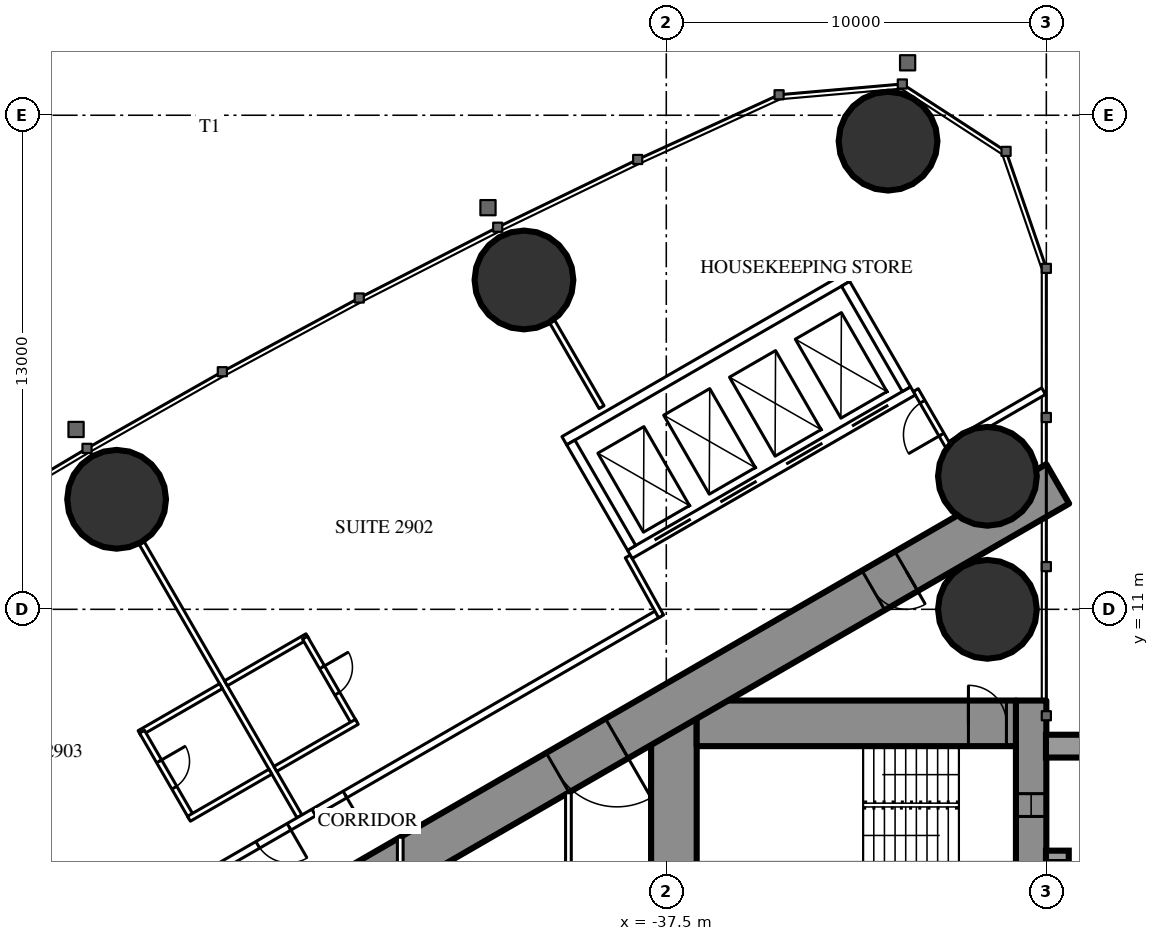
"""IFC4 building model, lengths in metres.
Left out: names, types, materials, properties, quantities, classifications, styles, units other than length and angle.
Written with IfcOpenShell. Run it as: python <this file> out.ifc"""

import sys

from ifc_helpers import new_model, si_unit, direction, frame, frame_2d, origin, origin_2d, place, context, subcontext, project, spatial, rectangle, hollow_circle, extrude, element, fill, save


model = new_model("IFC4")
c1 = context("Model", 3, precision=1e-05, world=origin(), true_north=direction((0.0, 1.0)))
c2 = subcontext(c1, "Body", "Model", "MODEL_VIEW")
j1 = project(units=[si_unit("LENGTHUNIT", "METRE"), si_unit("PLANEANGLEUNIT", "RADIAN")], contexts=[c1])
p1 = place(None, origin())
s1 = spatial("IfcSite", under=j1, at=p1, CompositionType="ELEMENT")
p2 = place(p1, origin())
s2 = spatial("IfcBuilding", under=s1, at=p2, CompositionType="ELEMENT")
p3 = place(p2, frame((0.0, 0.0, 111.6)))
s3 = spatial("IfcBuildingStorey", under=s2, at=p3, CompositionType="ELEMENT", Elevation=111.6)
for number, where, z_axis, x_axis in (
    (1, (-31.665, 23.318, 0.0), (0.0, 0.0, 1.0), (1.0, 0.0, 0.0)),
    (2, (-29.05, 11.0, 0.0), (0.0, 0.0, 1.0), (1.0, 0.0, 0.0)),
    (3, (-29.05, 14.5, 0.0), (0.0, 0.0, 1.0), (1.0, 0.0, 0.0)),
    (4, (-41.245, 19.666, 0.0), (0.0, 0.0, 1.0), (1.0, 0.0, 0.0)),
    (5, (-51.963, 13.895, 0.0), (0.0, 0.0, 1.0), (1.0, 0.0, 0.0)),
):
    element("IfcColumn", number, at=place(p3, frame(where, z_axis=z_axis, x_axis=x_axis)), inside=s3, PredefinedType="COLUMN", context=c2, shape_type="SweptSolid", body=[
        extrude(hollow_circle(Radius=1.3, WallThickness=0.1, at=origin_2d()), origin(), (0.0, 0.0, 1.0), 3.5),
    ])
p4 = place(p3, frame((-27.9, 8.6, 0.0), z_axis=(0.0, 0.0, 1.0), x_axis=(0.0, -1.0, 0.0)))
e6 = element("IfcWall", 6, at=p4, inside=s3, PredefinedType="SHEAR", context=c2, shape_type="SweptSolid", body=[
    extrude(rectangle(XDim=17.2, YDim=0.8, at=frame_2d((8.6, 0.0))), origin(), (0.0, 0.0, 1.0), 3.5),
])
p5 = place(p4, frame((2.45, 0.0, 0.6)))
e7 = element("IfcOpeningElement", 7, at=p5, cuts=e6, PredefinedType="OPENING", context=c2, shape_type="SweptSolid", body=[
    extrude(rectangle(XDim=0.6, YDim=2.1, at=frame_2d((0.3, 1.05))), frame((0.0, 0.41, 0.0), z_axis=(0.0, -1.0, 0.0), x_axis=(1.0, 0.0, 0.0)), (0.0, 0.0, 1.0), 0.82),
])
p6 = place(p4, frame((14.15, 0.0, 0.6)))
e8 = element("IfcOpeningElement", 8, at=p6, cuts=e6, PredefinedType="OPENING", context=c2, shape_type="SweptSolid", body=[
    extrude(rectangle(XDim=0.6, YDim=2.1, at=frame_2d((0.3, 1.05))), frame((0.0, 0.41, 0.0), z_axis=(0.0, -1.0, 0.0), x_axis=(1.0, 0.0, 0.0)), (0.0, 0.0, 1.0), 0.82),
])
p7 = place(p3, frame((-37.3, 8.6, 0.0), z_axis=(0.0, 0.0, 1.0), x_axis=(0.0, -1.0, 0.0)))
e9 = element("IfcWall", 9, at=p7, inside=s3, PredefinedType="SHEAR", context=c2, shape_type="SweptSolid", body=[
    extrude(rectangle(XDim=17.2, YDim=1.2, at=frame_2d((8.6, 0.0))), origin(), (0.0, 0.0, 1.0), 3.5),
])
p8 = place(p7, frame((7.7, 0.0, 0.0)))
e10 = element("IfcOpeningElement", 10, at=p8, cuts=e9, PredefinedType="OPENING", context=c2, shape_type="SweptSolid", body=[
    extrude(rectangle(XDim=1.8, YDim=2.2, at=frame_2d((0.9, 1.1))), frame((0.0, 0.61, 0.0), z_axis=(0.0, -1.0, 0.0), x_axis=(1.0, 0.0, 0.0)), (0.0, 0.0, 1.0), 1.22),
])
p9 = place(p3, frame((-28.3, 8.0, 0.0), z_axis=(0.0, 0.0, 1.0), x_axis=(-1.0, 0.0, 0.0)))
e11 = element("IfcWall", 11, at=p9, inside=s3, PredefinedType="SHEAR", context=c2, shape_type="SweptSolid", body=[
    extrude(rectangle(XDim=8.4, YDim=1.2, at=frame_2d((4.2, 0.0))), origin(), (0.0, 0.0, 1.0), 3.5),
])
p10 = place(p9, frame((0.25, 0.0, 0.0)))
e12 = element("IfcOpeningElement", 12, at=p10, cuts=e11, PredefinedType="OPENING", context=c2, shape_type="SweptSolid", body=[
    extrude(rectangle(XDim=1.0, YDim=2.2, at=frame_2d((0.5, 1.1))), frame((0.0, 0.61, 0.0), z_axis=(0.0, -1.0, 0.0), x_axis=(1.0, 0.0, 0.0)), (0.0, 0.0, 1.0), 1.22),
])
p11 = place(p3, frame((-27.2, 14.3, 0.0), z_axis=(0.0, 0.0, 1.0), x_axis=(-0.866026593062, -0.499997940104, 0.0)))
e13 = element("IfcWall", 13, at=p11, inside=s3, PredefinedType="SHEAR", context=c2, shape_type="SweptSolid", body=[
    extrude(rectangle(XDim=28.946, YDim=1.2, at=frame_2d((14.473, 0.0))), origin(), (0.0, 0.0, 1.0), 3.5),
])
p12 = place(p11, frame((4.6, 0.0, 0.0)))
e14 = element("IfcOpeningElement", 14, at=p12, cuts=e13, PredefinedType="OPENING", context=c2, shape_type="SweptSolid", body=[
    extrude(rectangle(XDim=1.0, YDim=2.2, at=frame_2d((0.5, 1.1))), frame((0.0, 0.61, 0.0), z_axis=(0.0, -1.0, 0.0), x_axis=(1.0, 0.0, 0.0)), (0.0, 0.0, 1.0), 1.22),
])
p13 = place(p11, frame((13.395, 0.0, 0.0)))
e15 = element("IfcOpeningElement", 15, at=p13, cuts=e13, PredefinedType="OPENING", context=c2, shape_type="SweptSolid", body=[
    extrude(rectangle(XDim=1.8, YDim=2.2, at=frame_2d((0.9, 1.1))), frame((0.0, 0.61, 0.0), z_axis=(0.0, -1.0, 0.0), x_axis=(1.0, 0.0, 0.0)), (0.0, 0.0, 1.0), 1.22),
])
p14 = place(p3, frame((-47.151, 5.552, 0.0), z_axis=(0.0, 0.0, 1.0), x_axis=(-0.500003012045, 0.866023664773, 0.0)))
e16 = element("IfcWall", 16, at=p14, inside=s3, PredefinedType="PARTITIONING", context=c2, shape_type="SweptSolid", body=[
    extrude(rectangle(XDim=8.311, YDim=0.15, at=frame_2d((4.156, 0.0))), origin(), (0.0, 0.0, 1.0), 2.2),
])
p15 = place(p3, frame((-39.202, 16.32, 0.0), z_axis=(0.0, 0.0, 1.0), x_axis=(-0.499947391036, 0.866055775454, 0.0)))
e17 = element("IfcWall", 17, at=p15, inside=s3, PredefinedType="PARTITIONING", context=c2, shape_type="SweptSolid", body=[
    extrude(rectangle(XDim=2.599, YDim=0.15, at=frame_2d((1.3, 0.0))), origin(), (0.0, 0.0, 1.0), 3.25),
])
p16 = place(p3, frame((-27.572, 16.741, 0.0), z_axis=(0.0, 0.0, 1.0), x_axis=(-0.866034618596, -0.499984039138, 0.0)))
e18 = element("IfcWall", 18, at=p16, inside=s3, PredefinedType="PARTITIONING", context=c2, shape_type="SweptSolid", body=[
    extrude(rectangle(XDim=2.854, YDim=0.2, at=frame_2d((1.427, 0.0))), origin(), (0.0, 0.0, 1.0), 3.25),
])
p17 = place(p3, frame((-37.7, 10.894, 0.0), z_axis=(0.0, 0.0, 1.0), x_axis=(-0.866027905338, -0.499995667157, 0.0)))
e19 = element("IfcWall", 19, at=p17, inside=s3, PredefinedType="PARTITIONING", context=c2, shape_type="SweptSolid", body=[
    extrude(rectangle(XDim=21.787, YDim=0.2, at=frame_2d((10.894, 0.0))), origin(), (0.0, 0.0, 1.0), 3.25),
])
p18 = place(p17, frame((11.23, 0.0, 0.0)))
e20 = element("IfcOpeningElement", 20, at=p18, cuts=e19, PredefinedType="OPENING", context=c2, shape_type="SweptSolid", body=[
    extrude(rectangle(XDim=0.95, YDim=2.2, at=frame_2d((0.475, 1.1))), frame((0.0, 0.11, 0.0), z_axis=(0.0, -1.0, 0.0), x_axis=(1.0, 0.0, 0.0)), (0.0, 0.0, 1.0), 0.22),
])
p19 = place(p17, frame((9.531, 0.0, 0.0)))
e21 = element("IfcOpeningElement", 21, at=p19, cuts=e19, PredefinedType="OPENING", context=c2, shape_type="SweptSolid", body=[
    extrude(rectangle(XDim=0.95, YDim=2.2, at=frame_2d((0.475, 1.1))), frame((0.0, 0.11, 0.0), z_axis=(0.0, -1.0, 0.0), x_axis=(1.0, 0.0, 0.0)), (0.0, 0.0, 1.0), 0.22),
])
p20 = place(p3, frame((-38.513, 12.392, 0.0), z_axis=(0.0, 0.0, 1.0), x_axis=(0.485585508183, -0.874189175317, 0.0)))
e22 = element("IfcWall", 22, at=p20, inside=s3, PredefinedType="PARTITIONING", context=c2, shape_type="SweptSolid", body=[
    extrude(rectangle(XDim=1.805, YDim=0.15, at=frame_2d((0.902, 0.0))), origin(), (0.0, 0.0, 1.0), 3.25),
])
p21 = place(p3, frame((-30.033, 15.205, 0.0), z_axis=(0.0, 0.0, 1.0), x_axis=(-0.499980071345, 0.866036909293, 0.0)))
e23 = element("IfcWall", 23, at=p21, inside=s3, PredefinedType="PARTITIONING", context=c2, shape_type="SweptSolid", body=[
    extrude(rectangle(XDim=1.805, YDim=0.15, at=frame_2d((0.902, 0.0))), origin(), (0.0, 0.0, 1.0), 2.2),
])
p22 = place(p21, frame((0.452, 0.0, 0.0)))
e24 = element("IfcOpeningElement", 24, at=p22, cuts=e23, PredefinedType="OPENING", context=c2, shape_type="SweptSolid", body=[
    extrude(rectangle(XDim=1.0, YDim=2.2, at=frame_2d((0.5, 1.1))), frame((0.0, 0.085, 0.0), z_axis=(0.0, -1.0, 0.0), x_axis=(1.0, 0.0, 0.0)), (0.0, 0.0, 1.0), 0.17),
])
p23 = place(p3, frame((-49.216, 8.979, 0.0), z_axis=(0.0, 0.0, 1.0), x_axis=(-0.866031185235, -0.4999899861, 0.0)))
e25 = element("IfcWall", 25, at=p23, inside=s3, PredefinedType="PARTITIONING", context=c2, shape_type="SweptSolid", body=[
    extrude(rectangle(XDim=2.475, YDim=0.15, at=frame_2d((1.238, 0.0))), origin(), (0.0, 0.0, 1.0), 3.25),
])
p24 = place(p3, frame((-49.995, 5.527, 0.0), z_axis=(0.0, 0.0, 1.0), x_axis=(-0.500006934395, 0.866021400173, 0.0)))
e26 = element("IfcWall", 26, at=p24, inside=s3, PredefinedType="PARTITIONING", context=c2, shape_type="SweptSolid", body=[
    extrude(rectangle(XDim=2.6, YDim=0.15, at=frame_2d((1.3, 0.0))), origin(), (0.0, 0.0, 1.0), 3.25),
])
p25 = place(p24, frame((0.9, 0.0, 0.0)))
e27 = element("IfcOpeningElement", 27, at=p25, cuts=e26, PredefinedType="OPENING", context=c2, shape_type="SweptSolid", body=[
    extrude(rectangle(XDim=0.8, YDim=2.2, at=frame_2d((0.4, 1.1))), frame((0.0, 0.085, 0.0), z_axis=(0.0, -1.0, 0.0), x_axis=(1.0, 0.0, 0.0)), (0.0, 0.0, 1.0), 0.17),
])
p26 = place(p3, frame((-47.916, 6.727, 0.0), z_axis=(0.0, 0.0, 1.0), x_axis=(-0.866031185235, -0.4999899861, 0.0)))
e28 = element("IfcWall", 28, at=p26, inside=s3, PredefinedType="PARTITIONING", context=c2, shape_type="SweptSolid", body=[
    extrude(rectangle(XDim=2.475, YDim=0.15, at=frame_2d((1.238, 0.0))), origin(), (0.0, 0.0, 1.0), 3.25),
])
p27 = place(p3, frame((-46.943, 10.292, 0.0), z_axis=(0.0, 0.0, 1.0), x_axis=(-0.866006523861, -0.500032699561, 0.0)))
e29 = element("IfcWall", 29, at=p27, inside=s3, PredefinedType="PARTITIONING", context=c2, shape_type="SweptSolid", body=[
    extrude(rectangle(XDim=2.475, YDim=0.15, at=frame_2d((1.237, 0.0))), origin(), (0.0, 0.0, 1.0), 3.25),
])
p28 = place(p3, frame((-45.708, 8.002, 0.0), z_axis=(0.0, 0.0, 1.0), x_axis=(-0.500047596559, 0.865997922154, 0.0)))
e30 = element("IfcWall", 30, at=p28, inside=s3, PredefinedType="PARTITIONING", context=c2, shape_type="SweptSolid", body=[
    extrude(rectangle(XDim=2.6, YDim=0.15, at=frame_2d((1.3, 0.0))), origin(), (0.0, 0.0, 1.0), 3.25),
])
p29 = place(p28, frame((0.9, 0.0, 0.0)))
e31 = element("IfcOpeningElement", 31, at=p29, cuts=e30, PredefinedType="OPENING", context=c2, shape_type="SweptSolid", body=[
    extrude(rectangle(XDim=0.8, YDim=2.2, at=frame_2d((0.4, 1.1))), frame((0.0, 0.085, 0.0), z_axis=(0.0, -1.0, 0.0), x_axis=(1.0, 0.0, 0.0)), (0.0, 0.0, 1.0), 0.17),
])
p30 = place(p3, frame((-45.643, 8.04, 0.0), z_axis=(0.0, 0.0, 1.0), x_axis=(-0.866006523861, -0.500032699561, 0.0)))
e32 = element("IfcWall", 32, at=p30, inside=s3, PredefinedType="PARTITIONING", context=c2, shape_type="SweptSolid", body=[
    extrude(rectangle(XDim=2.475, YDim=0.15, at=frame_2d((1.237, 0.0))), origin(), (0.0, 0.0, 1.0), 3.25),
])
p31 = place(p3, frame((-40.075, 6.174, 0.0), z_axis=(0.0, 0.0, 1.0), x_axis=(0.0, -1.0, 0.0)))
e33 = element("IfcWall", 33, at=p31, inside=s3, PredefinedType="PARTITIONING", context=c2, shape_type="SweptSolid", body=[
    extrude(rectangle(XDim=7.374, YDim=0.15, at=frame_2d((3.687, 0.0))), origin(), (0.0, 0.0, 1.0), 3.25),
])
p32 = place(p31, frame((2.787, 0.0, 0.0)))
e34 = element("IfcOpeningElement", 34, at=p32, cuts=e33, PredefinedType="OPENING", context=c2, shape_type="SweptSolid", body=[
    extrude(rectangle(XDim=1.8, YDim=2.2, at=frame_2d((0.9, 1.1))), frame((0.0, 0.085, 0.0), z_axis=(0.0, -1.0, 0.0), x_axis=(1.0, 0.0, 0.0)), (0.0, 0.0, 1.0), 0.17),
])
p33 = place(p3, frame((-44.5, 5.005, 0.0), z_axis=(0.0, 0.0, 1.0), x_axis=(0.0, -1.0, 0.0)))
e35 = element("IfcWall", 35, at=p33, inside=s3, PredefinedType="PARTITIONING", context=c2, shape_type="SweptSolid", body=[
    extrude(rectangle(XDim=10.009, YDim=0.15, at=frame_2d((5.005, 0.0))), origin(), (0.0, 0.0, 1.0), 2.45),
])
p34 = place(p33, frame((2.002, 0.0, 0.0)))
e36 = element("IfcOpeningElement", 36, at=p34, cuts=e35, PredefinedType="OPENING", context=c2, shape_type="SweptSolid", body=[
    extrude(rectangle(XDim=1.0, YDim=2.2, at=frame_2d((0.5, 1.1))), frame((0.0, 0.085, 0.0), z_axis=(0.0, -1.0, 0.0), x_axis=(1.0, 0.0, 0.0)), (0.0, 0.0, 1.0), 0.17),
])
p35 = place(p33, frame((7.007, 0.0, 0.0)))
e37 = element("IfcOpeningElement", 37, at=p35, cuts=e35, PredefinedType="OPENING", context=c2, shape_type="SweptSolid", body=[
    extrude(rectangle(XDim=1.0, YDim=2.2, at=frame_2d((0.5, 1.1))), frame((0.0, 0.085, 0.0), z_axis=(0.0, -1.0, 0.0), x_axis=(1.0, 0.0, 0.0)), (0.0, 0.0, 1.0), 0.17),
])
p36 = place(p3, frame((-31.01, 16.747, 0.0), z_axis=(0.0, 0.0, 1.0), x_axis=(-0.866028165386, -0.499995216735, 0.0)))
e38 = element("IfcWall", 38, at=p36, inside=s3, PredefinedType="PARTITIONING", context=c2, shape_type="SweptSolid", body=[
    extrude(rectangle(XDim=8.6, YDim=0.25, at=frame_2d((4.3, 0.0))), origin(), (0.0, 0.0, 1.0), 3.25),
])
p37 = place(p36, frame((0.75, 0.0, 0.0)))
e39 = element("IfcOpeningElement", 39, at=p37, cuts=e38, PredefinedType="OPENING", context=c2, shape_type="SweptSolid", body=[
    extrude(rectangle(XDim=1.1, YDim=2.2, at=frame_2d((0.55, 1.1))), frame((0.0, 0.135, 0.0), z_axis=(0.0, -1.0, 0.0), x_axis=(1.0, 0.0, 0.0)), (0.0, 0.0, 1.0), 0.27),
])
p38 = place(p36, frame((2.75, 0.0, 0.0)))
e40 = element("IfcOpeningElement", 40, at=p38, cuts=e38, PredefinedType="OPENING", context=c2, shape_type="SweptSolid", body=[
    extrude(rectangle(XDim=1.1, YDim=2.2, at=frame_2d((0.55, 1.1))), frame((0.0, 0.135, 0.0), z_axis=(0.0, -1.0, 0.0), x_axis=(1.0, 0.0, 0.0)), (0.0, 0.0, 1.0), 0.27),
])
p39 = place(p36, frame((4.75, 0.0, 0.0)))
e41 = element("IfcOpeningElement", 41, at=p39, cuts=e38, PredefinedType="OPENING", context=c2, shape_type="SweptSolid", body=[
    extrude(rectangle(XDim=1.1, YDim=2.2, at=frame_2d((0.55, 1.1))), frame((0.0, 0.135, 0.0), z_axis=(0.0, -1.0, 0.0), x_axis=(1.0, 0.0, 0.0)), (0.0, 0.0, 1.0), 0.27),
])
p40 = place(p36, frame((6.75, 0.0, 0.0)))
e42 = element("IfcOpeningElement", 42, at=p40, cuts=e38, PredefinedType="OPENING", context=c2, shape_type="SweptSolid", body=[
    extrude(rectangle(XDim=1.1, YDim=2.2, at=frame_2d((0.55, 1.1))), frame((0.0, 0.135, 0.0), z_axis=(0.0, -1.0, 0.0), x_axis=(1.0, 0.0, 0.0)), (0.0, 0.0, 1.0), 0.27),
])
p41 = place(p3, frame((-32.736, 19.736, 0.0), z_axis=(0.0, 0.0, 1.0), x_axis=(-0.866028165386, -0.499995216735, 0.0)))
e43 = element("IfcWall", 43, at=p41, inside=s3, PredefinedType="PARTITIONING", context=c2, shape_type="SweptSolid", body=[
    extrude(rectangle(XDim=8.6, YDim=0.25, at=frame_2d((4.3, 0.0))), origin(), (0.0, 0.0, 1.0), 3.25),
])
p42 = place(p3, frame((-31.181, 16.793, 0.0), z_axis=(0.0, 0.0, 1.0), x_axis=(-0.499929347863, 0.866066190972, 0.0)))
e44 = element("IfcWall", 44, at=p42, inside=s3, PredefinedType="PARTITIONING", context=c2, shape_type="SweptSolid", body=[
    extrude(rectangle(XDim=3.201, YDim=0.25, at=frame_2d((1.6, 0.0))), origin(), (0.0, 0.0, 1.0), 3.25),
])
p43 = place(p3, frame((-38.413, 12.618, 0.0), z_axis=(0.0, 0.0, 1.0), x_axis=(-0.499872130319, 0.866099216793, 0.0)))
e45 = element("IfcWall", 45, at=p43, inside=s3, PredefinedType="PARTITIONING", context=c2, shape_type="SweptSolid", body=[
    extrude(rectangle(XDim=3.2, YDim=0.25, at=frame_2d((1.6, 0.0))), origin(), (0.0, 0.0, 1.0), 3.25),
])
p44 = place(p25, origin())
e46 = element("IfcDoor", 46, at=p44, inside=s3, OperationType="SINGLE_SWING_RIGHT", PredefinedType="DOOR", context=c2, shape_type="SweptSolid", body=[
    extrude(rectangle(XDim=0.8, YDim=2.2, at=frame_2d((0.4, 1.1))), frame((0.0, 0.025, 0.0), z_axis=(0.0, -1.0, 0.0), x_axis=(1.0, 0.0, 0.0)), (0.0, 0.0, 1.0), 0.05),
])
fill(e27, e46)
p45 = place(p18, origin())
e47 = element("IfcDoor", 47, at=p45, inside=s3, OperationType="SINGLE_SWING_LEFT", PredefinedType="DOOR", context=c2, shape_type="SweptSolid", body=[
    extrude(rectangle(XDim=0.95, YDim=2.2, at=frame_2d((0.475, 1.1))), frame((0.0, 0.025, 0.0), z_axis=(0.0, -1.0, 0.0), x_axis=(1.0, 0.0, 0.0)), (0.0, 0.0, 1.0), 0.05),
])
fill(e20, e47)
p46 = place(p29, origin())
e48 = element("IfcDoor", 48, at=p46, inside=s3, OperationType="SINGLE_SWING_RIGHT", PredefinedType="DOOR", context=c2, shape_type="SweptSolid", body=[
    extrude(rectangle(XDim=0.8, YDim=2.2, at=frame_2d((0.4, 1.1))), frame((0.0, 0.025, 0.0), z_axis=(0.0, -1.0, 0.0), x_axis=(1.0, 0.0, 0.0)), (0.0, 0.0, 1.0), 0.05),
])
fill(e31, e48)
p47 = place(p19, origin())
e49 = element("IfcDoor", 49, at=p47, inside=s3, OperationType="SINGLE_SWING_LEFT", PredefinedType="DOOR", context=c2, shape_type="SweptSolid", body=[
    extrude(rectangle(XDim=0.95, YDim=2.2, at=frame_2d((0.475, 1.1))), frame((0.0, 0.025, 0.0), z_axis=(0.0, -1.0, 0.0), x_axis=(1.0, 0.0, 0.0)), (0.0, 0.0, 1.0), 0.05),
])
fill(e21, e49)
p48 = place(p22, origin())
e50 = element("IfcDoor", 50, at=p48, inside=s3, OperationType="SINGLE_SWING_LEFT", PredefinedType="DOOR", context=c2, shape_type="SweptSolid", body=[
    extrude(rectangle(XDim=1.0, YDim=2.2, at=frame_2d((0.5, 1.1))), frame((0.0, 0.025, 0.0), z_axis=(0.0, -1.0, 0.0), x_axis=(1.0, 0.0, 0.0)), (0.0, 0.0, 1.0), 0.05),
])
fill(e24, e50)
p49 = place(p12, origin())
e51 = element("IfcDoor", 51, at=p49, inside=s3, OperationType="SINGLE_SWING_LEFT", PredefinedType="DOOR", context=c2, shape_type="SweptSolid", body=[
    extrude(rectangle(XDim=1.0, YDim=2.2, at=frame_2d((0.5, 1.1))), frame((0.0, 0.025, 0.0), z_axis=(0.0, -1.0, 0.0), x_axis=(1.0, 0.0, 0.0)), (0.0, 0.0, 1.0), 0.05),
])
fill(e14, e51)
p50 = place(p13, origin())
e52 = element("IfcDoor", 52, at=p50, inside=s3, OperationType="DOUBLE_DOOR_SINGLE_SWING", PredefinedType="DOOR", context=c2, shape_type="SweptSolid", body=[
    extrude(rectangle(XDim=1.8, YDim=2.2, at=frame_2d((0.9, 1.1))), frame((0.0, 0.025, 0.0), z_axis=(0.0, -1.0, 0.0), x_axis=(1.0, 0.0, 0.0)), (0.0, 0.0, 1.0), 0.05),
])
fill(e15, e52)
p51 = place(p10, origin())
e53 = element("IfcDoor", 53, at=p51, inside=s3, OperationType="SINGLE_SWING_RIGHT", PredefinedType="DOOR", context=c2, shape_type="SweptSolid", body=[
    extrude(rectangle(XDim=1.0, YDim=2.2, at=frame_2d((0.5, 1.1))), frame((0.0, 0.025, 0.0), z_axis=(0.0, -1.0, 0.0), x_axis=(1.0, 0.0, 0.0)), (0.0, 0.0, 1.0), 0.05),
])
fill(e12, e53)
p52 = place(p37, origin())
e54 = element("IfcDoor", 54, at=p52, inside=s3, OperationType="DOUBLE_DOOR_SLIDING", PredefinedType="USERDEFINED", context=c2, shape_type="SweptSolid", body=[
    extrude(rectangle(XDim=1.1, YDim=2.2, at=frame_2d((0.55, 1.1))), frame((0.0, 0.025, 0.0), z_axis=(0.0, -1.0, 0.0), x_axis=(1.0, 0.0, 0.0)), (0.0, 0.0, 1.0), 0.05),
])
fill(e39, e54)
p53 = place(p38, origin())
e55 = element("IfcDoor", 55, at=p53, inside=s3, OperationType="DOUBLE_DOOR_SLIDING", PredefinedType="USERDEFINED", context=c2, shape_type="SweptSolid", body=[
    extrude(rectangle(XDim=1.1, YDim=2.2, at=frame_2d((0.55, 1.1))), frame((0.0, 0.025, 0.0), z_axis=(0.0, -1.0, 0.0), x_axis=(1.0, 0.0, 0.0)), (0.0, 0.0, 1.0), 0.05),
])
fill(e40, e55)
p54 = place(p39, origin())
e56 = element("IfcDoor", 56, at=p54, inside=s3, OperationType="DOUBLE_DOOR_SLIDING", PredefinedType="USERDEFINED", context=c2, shape_type="SweptSolid", body=[
    extrude(rectangle(XDim=1.1, YDim=2.2, at=frame_2d((0.55, 1.1))), frame((0.0, 0.025, 0.0), z_axis=(0.0, -1.0, 0.0), x_axis=(1.0, 0.0, 0.0)), (0.0, 0.0, 1.0), 0.05),
])
fill(e41, e56)
p55 = place(p40, origin())
e57 = element("IfcDoor", 57, at=p55, inside=s3, OperationType="DOUBLE_DOOR_SLIDING", PredefinedType="USERDEFINED", context=c2, shape_type="SweptSolid", body=[
    extrude(rectangle(XDim=1.1, YDim=2.2, at=frame_2d((0.55, 1.1))), frame((0.0, 0.025, 0.0), z_axis=(0.0, -1.0, 0.0), x_axis=(1.0, 0.0, 0.0)), (0.0, 0.0, 1.0), 0.05),
])
fill(e42, e57)
p56 = place(p5, origin())
e58 = element("IfcWindow", 58, at=p56, inside=s3, PartitioningType="SINGLE_PANEL", PredefinedType="WINDOW", context=c2, shape_type="SweptSolid", body=[
    extrude(rectangle(XDim=0.6, YDim=2.1, at=frame_2d((0.3, 1.05))), frame((0.0, 0.03, 0.0), z_axis=(0.0, -1.0, 0.0), x_axis=(1.0, 0.0, 0.0)), (0.0, 0.0, 1.0), 0.06),
])
fill(e7, e58)
save(model, sys.argv[1])
